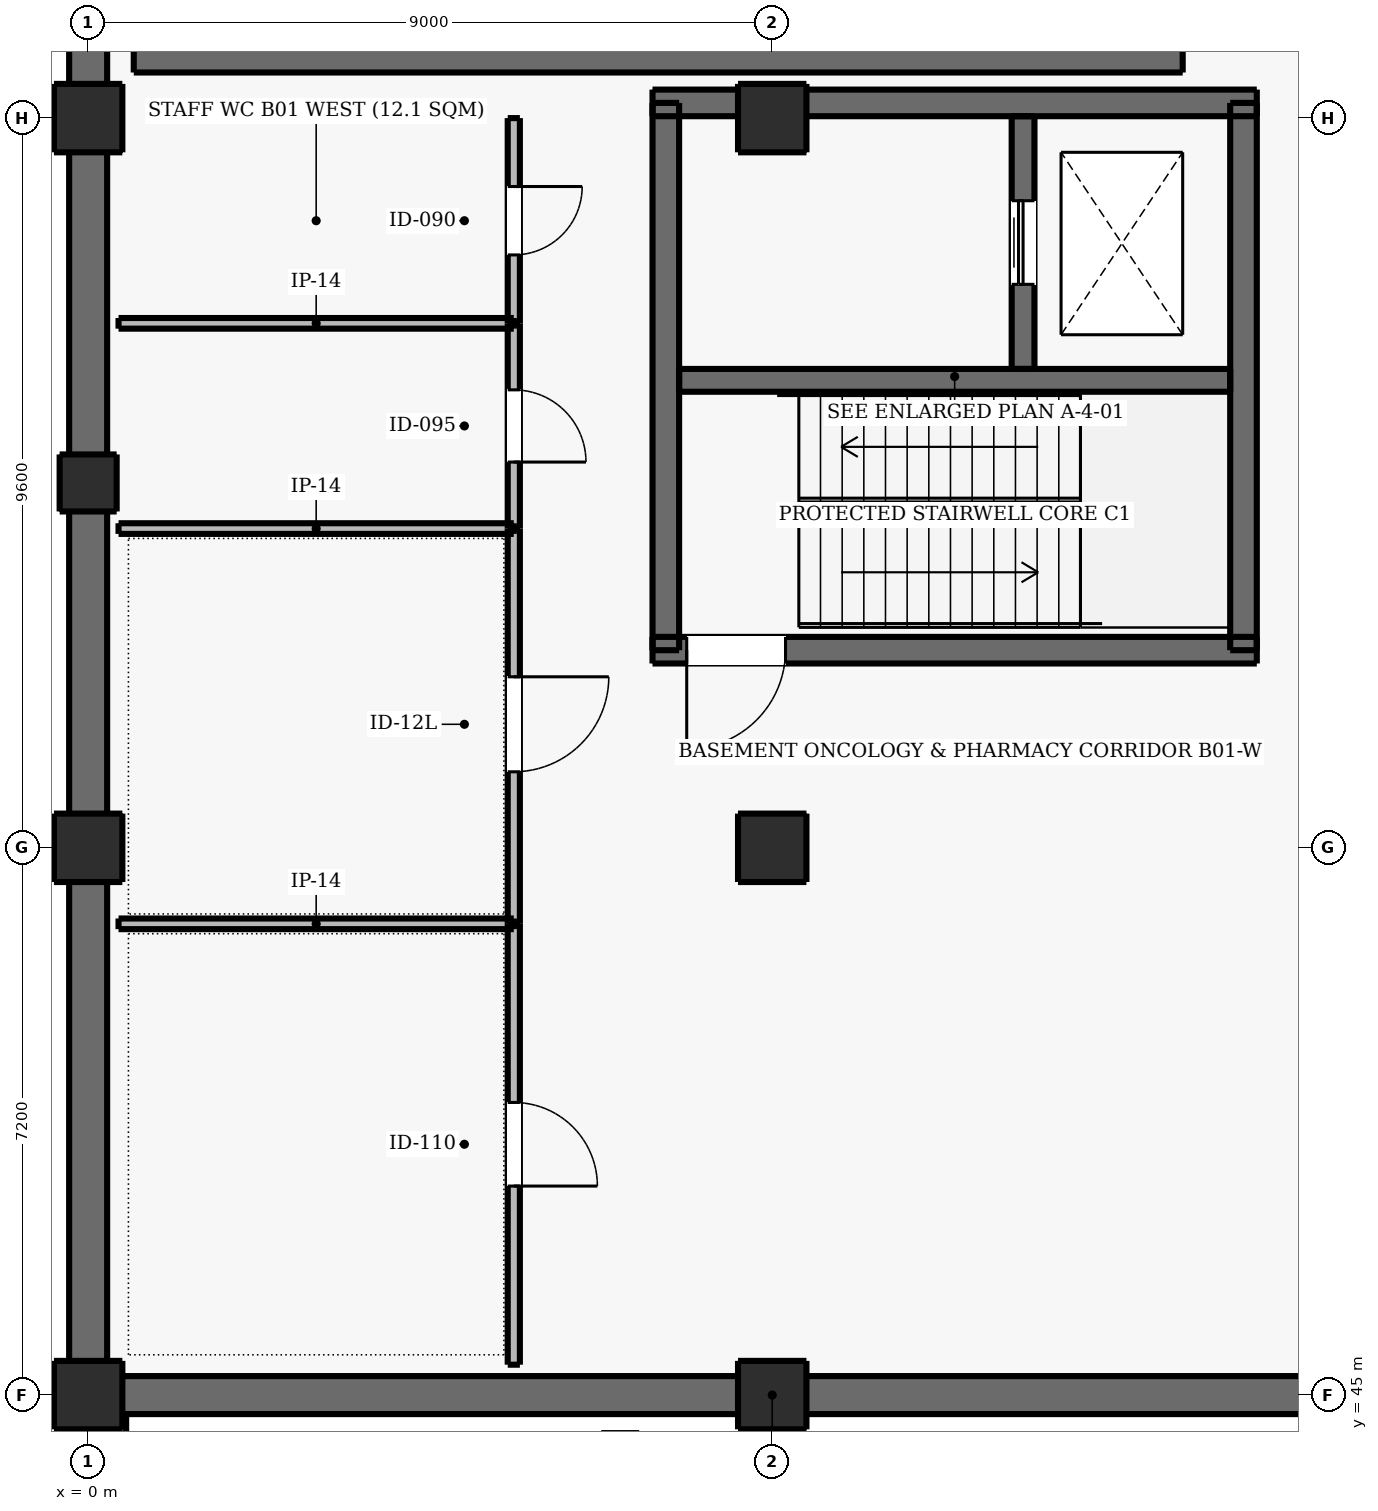
"""IFC4 building model, lengths in metres.
Left out: names, types, materials, properties, quantities, classifications, styles, units other than length and angle.
Written with IfcOpenShell. Run it as: python <this file> out.ifc"""

import sys

from ifc_helpers import new_model, si_unit, direction, frame, frame_2d, origin, origin_2d, place, context, subcontext, project, spatial, rectangle, extrude, element, fill, save


model = new_model("IFC4")
c1 = context("Model", 3, precision=1e-05, world=origin(), true_north=direction((0.0, 1.0)))
c2 = subcontext(c1, "Body", "Model", "MODEL_VIEW")
j1 = project(units=[si_unit("LENGTHUNIT", "METRE"), si_unit("PLANEANGLEUNIT", "RADIAN")], contexts=[c1])
p1 = place(None, origin())
s1 = spatial("IfcSite", under=j1, at=p1, CompositionType="ELEMENT")
p2 = place(p1, origin())
s2 = spatial("IfcBuilding", under=s1, at=p2, CompositionType="ELEMENT")
p3 = place(p2, frame((0.0, 0.0, -4.8)))
s3 = spatial("IfcBuildingStorey", under=s2, at=p3, CompositionType="ELEMENT", Elevation=-4.8)
for number, where, z_axis, x_axis in (
    (1, (0.0, 45.0, 0.0), (0.0, 0.0, 1.0), (1.0, 0.0, 0.0)),
    (2, (0.0, 52.2, 0.0), (0.0, 0.0, 1.0), (1.0, 0.0, 0.0)),
):
    element("IfcColumn", number, at=place(p3, frame(where, z_axis=z_axis, x_axis=x_axis)), inside=s3, PredefinedType="COLUMN", context=c2, shape_type="SweptSolid", body=[
        extrude(rectangle(XDim=0.9, YDim=0.9, at=origin_2d()), origin(), (0.0, 0.0, 1.0), 4.8),
    ])
p4 = place(p3, frame((0.0, 57.0, 0.0), z_axis=(0.0, 0.0, 1.0), x_axis=(1.0, 0.0, 0.0)))
e3 = element("IfcColumn", 3, at=p4, inside=s3, PredefinedType="PILASTER", context=c2, shape_type="SweptSolid", body=[
    extrude(rectangle(XDim=0.75, YDim=0.75, at=origin_2d()), origin(), (0.0, 0.0, 1.0), 4.8),
])
for number, where, z_axis, x_axis in (
    (4, (0.0, 61.8, 0.0), (0.0, 0.0, 1.0), (1.0, 0.0, 0.0)),
    (5, (9.0, 45.0, 0.0), (0.0, 0.0, 1.0), (1.0, 0.0, 0.0)),
    (6, (9.0, 52.2, 0.0), (0.0, 0.0, 1.0), (1.0, 0.0, 0.0)),
    (7, (9.0, 61.8, 0.0), (0.0, 0.0, 1.0), (1.0, 0.0, 0.0)),
):
    element("IfcColumn", number, at=place(p3, frame(where, z_axis=z_axis, x_axis=x_axis)), inside=s3, PredefinedType="COLUMN", context=c2, shape_type="SweptSolid", body=[
        extrude(rectangle(XDim=0.9, YDim=0.9, at=origin_2d()), origin(), (0.0, 0.0, 1.0), 4.8),
    ])
p5 = place(p3, frame((0.6, 63.0, 0.0), z_axis=(0.0, 0.0, 1.0), x_axis=(1.0, 0.0, 0.0)))
e8 = element("IfcWall", 8, at=p5, inside=s3, PredefinedType="SOLIDWALL", context=c2, shape_type="SweptSolid", body=[
    extrude(rectangle(XDim=13.8, YDim=1.2, at=frame_2d((6.9, 0.0))), origin(), (0.0, 0.0, 1.0), 4.5),
])
p6 = place(p3, frame((0.0, 45.0, 0.0), z_axis=(0.0, 0.0, 1.0), x_axis=(0.0, 1.0, 0.0)))
e9 = element("IfcWall", 9, at=p6, inside=s3, PredefinedType="SOLIDWALL", context=c2, shape_type="SweptSolid", body=[
    extrude(rectangle(XDim=50.8, YDim=0.5, at=frame_2d((25.4, 0.0))), origin(), (0.0, 0.0, 1.0), 4.5),
])
p7 = place(p3, frame((18.0, 45.0, 0.0), z_axis=(0.0, 0.0, 1.0), x_axis=(-1.0, 0.0, 0.0)))
e10 = element("IfcWall", 10, at=p7, inside=s3, PredefinedType="SOLIDWALL", context=c2, shape_type="SweptSolid", body=[
    extrude(rectangle(XDim=18.0, YDim=0.5, at=frame_2d((9.0, 0.0))), origin(), (0.0, 0.0, 1.0), 4.5),
])
p8 = place(p3, frame((0.25, 0.5, 0.0), z_axis=(0.0, 0.0, 1.0), x_axis=(0.0, 1.0, 0.0)))
e11 = element("IfcWall", 11, at=p8, inside=s3, PredefinedType="SOLIDWALL", context=c2, shape_type="SweptSolid", body=[
    extrude(rectangle(XDim=44.25, YDim=0.5, at=frame_2d((22.125, 0.0))), origin(), (0.0, 0.0, 1.0), 4.5),
])
p9 = place(p3, frame((7.425, 54.8, 0.0), z_axis=(0.0, 0.0, 1.0), x_axis=(1.0, 0.0, 0.0)))
e12 = element("IfcWall", 12, at=p9, inside=s3, PredefinedType="SHEAR", context=c2, shape_type="SweptSolid", body=[
    extrude(rectangle(XDim=7.95, YDim=0.35, at=frame_2d((3.975, 0.0))), origin(), (0.0, 0.0, 1.0), 4.8),
])
p10 = place(p9, frame((0.45, 0.0, 0.0)))
e13 = element("IfcOpeningElement", 13, at=p10, cuts=e12, PredefinedType="OPENING", context=c2, shape_type="SweptSolid", body=[
    extrude(rectangle(XDim=1.3, YDim=2.15, at=frame_2d((0.65, 1.075))), frame((0.0, 0.185, 0.0), z_axis=(0.0, -1.0, 0.0), x_axis=(1.0, 0.0, 0.0)), (0.0, 0.0, 1.0), 0.37),
])
p11 = place(p3, frame((7.425, 62.0, 0.0), z_axis=(0.0, 0.0, 1.0), x_axis=(1.0, 0.0, 0.0)))
e14 = element("IfcWall", 14, at=p11, inside=s3, PredefinedType="SHEAR", context=c2, shape_type="SweptSolid", body=[
    extrude(rectangle(XDim=7.95, YDim=0.35, at=frame_2d((3.975, 0.0))), origin(), (0.0, 0.0, 1.0), 4.8),
])
for number, where, z_axis, x_axis in (
    (15, (7.6, 54.8, 0.0), (0.0, 0.0, 1.0), (0.0, 1.0, 0.0)),
    (16, (15.2, 54.8, 0.0), (0.0, 0.0, 1.0), (0.0, 1.0, 0.0)),
):
    element("IfcWall", number, at=place(p3, frame(where, z_axis=z_axis, x_axis=x_axis)), inside=s3, PredefinedType="SHEAR", context=c2, shape_type="SweptSolid", body=[
        extrude(rectangle(XDim=7.2, YDim=0.35, at=frame_2d((3.6, 0.0))), origin(), (0.0, 0.0, 1.0), 4.8),
    ])
p12 = place(p3, frame((7.775, 58.35, 0.0), z_axis=(0.0, 0.0, 1.0), x_axis=(1.0, 0.0, 0.0)))
e17 = element("IfcWall", 17, at=p12, inside=s3, PredefinedType="SHEAR", context=c2, shape_type="SweptSolid", body=[
    extrude(rectangle(XDim=7.25, YDim=0.3, at=frame_2d((3.625, 0.0))), origin(), (0.0, 0.0, 1.0), 4.8),
])
p13 = place(p3, frame((12.3, 58.5, 0.0), z_axis=(0.0, 0.0, 1.0), x_axis=(0.0, 1.0, 0.0)))
e18 = element("IfcWall", 18, at=p13, inside=s3, PredefinedType="SHEAR", context=c2, shape_type="SweptSolid", body=[
    extrude(rectangle(XDim=3.325, YDim=0.3, at=frame_2d((1.663, 0.0))), origin(), (0.0, 0.0, 1.0), 4.8),
])
p14 = place(p13, frame((1.113, 0.0, 0.0)))
e19 = element("IfcOpeningElement", 19, at=p14, cuts=e18, PredefinedType="OPENING", context=c2, shape_type="SweptSolid", body=[
    extrude(rectangle(XDim=1.1, YDim=2.15, at=frame_2d((0.55, 1.075))), frame((0.0, 0.16, 0.0), z_axis=(0.0, -1.0, 0.0), x_axis=(1.0, 0.0, 0.0)), (0.0, 0.0, 1.0), 0.32),
])
p15 = place(p3, frame((5.6, 45.4, 0.0), z_axis=(0.0, 0.0, 1.0), x_axis=(0.0, 1.0, 0.0)))
e20 = element("IfcWall", 20, at=p15, inside=s3, PredefinedType="PARTITIONING", context=c2, shape_type="SweptSolid", body=[
    extrude(rectangle(XDim=5.8, YDim=0.16, at=frame_2d((2.9, 0.0))), origin(), (0.0, 0.0, 1.0), 4.5),
])
p16 = place(p15, frame((2.35, 0.0, 0.0)))
e21 = element("IfcOpeningElement", 21, at=p16, cuts=e20, PredefinedType="OPENING", context=c2, shape_type="SweptSolid", body=[
    extrude(rectangle(XDim=1.1, YDim=2.15, at=frame_2d((0.55, 1.075))), frame((0.0, 0.09, 0.0), z_axis=(0.0, -1.0, 0.0), x_axis=(1.0, 0.0, 0.0)), (0.0, 0.0, 1.0), 0.18),
])
p17 = place(p3, frame((0.4, 51.2, 0.0), z_axis=(0.0, 0.0, 1.0), x_axis=(1.0, 0.0, 0.0)))
e22 = element("IfcWall", 22, at=p17, inside=s3, PredefinedType="PARTITIONING", context=c2, shape_type="SweptSolid", body=[
    extrude(rectangle(XDim=5.2, YDim=0.14, at=frame_2d((2.6, 0.0))), origin(), (0.0, 0.0, 1.0), 4.5),
])
p18 = place(p3, frame((5.6, 51.2, 0.0), z_axis=(0.0, 0.0, 1.0), x_axis=(0.0, 1.0, 0.0)))
e23 = element("IfcWall", 23, at=p18, inside=s3, PredefinedType="PARTITIONING", context=c2, shape_type="SweptSolid", body=[
    extrude(rectangle(XDim=5.2, YDim=0.16, at=frame_2d((2.6, 0.0))), origin(), (0.0, 0.0, 1.0), 4.5),
])
p19 = place(p18, frame((2.0, 0.0, 0.0)))
e24 = element("IfcOpeningElement", 24, at=p19, cuts=e23, PredefinedType="OPENING", context=c2, shape_type="SweptSolid", body=[
    extrude(rectangle(XDim=1.25, YDim=2.2, at=frame_2d((0.625, 1.1))), frame((0.0, 0.09, 0.0), z_axis=(0.0, -1.0, 0.0), x_axis=(1.0, 0.0, 0.0)), (0.0, 0.0, 1.0), 0.18),
])
p20 = place(p3, frame((0.4, 56.4, 0.0), z_axis=(0.0, 0.0, 1.0), x_axis=(1.0, 0.0, 0.0)))
e25 = element("IfcWall", 25, at=p20, inside=s3, PredefinedType="PARTITIONING", context=c2, shape_type="SweptSolid", body=[
    extrude(rectangle(XDim=5.2, YDim=0.14, at=frame_2d((2.6, 0.0))), origin(), (0.0, 0.0, 1.0), 4.5),
])
p21 = place(p3, frame((5.6, 56.4, 0.0), z_axis=(0.0, 0.0, 1.0), x_axis=(0.0, 1.0, 0.0)))
e26 = element("IfcWall", 26, at=p21, inside=s3, PredefinedType="PARTITIONING", context=c2, shape_type="SweptSolid", body=[
    extrude(rectangle(XDim=2.7, YDim=0.16, at=frame_2d((1.35, 0.0))), origin(), (0.0, 0.0, 1.0), 4.5),
])
p22 = place(p21, frame((0.875, 0.0, 0.0)))
e27 = element("IfcOpeningElement", 27, at=p22, cuts=e26, PredefinedType="OPENING", context=c2, shape_type="SweptSolid", body=[
    extrude(rectangle(XDim=0.95, YDim=2.1, at=frame_2d((0.475, 1.05))), frame((0.0, 0.09, 0.0), z_axis=(0.0, -1.0, 0.0), x_axis=(1.0, 0.0, 0.0)), (0.0, 0.0, 1.0), 0.18),
])
p23 = place(p3, frame((0.4, 59.1, 0.0), z_axis=(0.0, 0.0, 1.0), x_axis=(1.0, 0.0, 0.0)))
e28 = element("IfcWall", 28, at=p23, inside=s3, PredefinedType="PARTITIONING", context=c2, shape_type="SweptSolid", body=[
    extrude(rectangle(XDim=5.2, YDim=0.14, at=frame_2d((2.6, 0.0))), origin(), (0.0, 0.0, 1.0), 4.5),
])
p24 = place(p3, frame((5.6, 59.1, 0.0), z_axis=(0.0, 0.0, 1.0), x_axis=(0.0, 1.0, 0.0)))
e29 = element("IfcWall", 29, at=p24, inside=s3, PredefinedType="PARTITIONING", context=c2, shape_type="SweptSolid", body=[
    extrude(rectangle(XDim=2.7, YDim=0.16, at=frame_2d((1.35, 0.0))), origin(), (0.0, 0.0, 1.0), 4.5),
])
p25 = place(p24, frame((0.9, 0.0, 0.0)))
e30 = element("IfcOpeningElement", 30, at=p25, cuts=e29, PredefinedType="OPENING", context=c2, shape_type="SweptSolid", body=[
    extrude(rectangle(XDim=0.9, YDim=2.1, at=frame_2d((0.45, 1.05))), frame((0.0, 0.09, 0.0), z_axis=(0.0, -1.0, 0.0), x_axis=(1.0, 0.0, 0.0)), (0.0, 0.0, 1.0), 0.18),
])
p26 = place(p14, origin())
e31 = element("IfcDoor", 31, at=p26, inside=s3, OperationType="DOUBLE_DOOR_SLIDING", PredefinedType="DOOR", context=c2, shape_type="SweptSolid", body=[
    extrude(rectangle(XDim=1.1, YDim=2.15, at=frame_2d((0.55, 1.075))), frame((0.0, 0.025, 0.0), z_axis=(0.0, -1.0, 0.0), x_axis=(1.0, 0.0, 0.0)), (0.0, 0.0, 1.0), 0.05),
])
fill(e19, e31)
p27 = place(p10, frame((1.3, 0.0, 0.0), z_axis=(0.0, 0.0, 1.0), x_axis=(-1.0, 0.0, 0.0)))
e32 = element("IfcDoor", 32, at=p27, inside=s3, OperationType="SINGLE_SWING_LEFT", PredefinedType="DOOR", context=c2, shape_type="SweptSolid", body=[
    extrude(rectangle(XDim=1.3, YDim=2.15, at=frame_2d((0.65, 1.075))), frame((0.0, 0.025, 0.0), z_axis=(0.0, -1.0, 0.0), x_axis=(1.0, 0.0, 0.0)), (0.0, 0.0, 1.0), 0.05),
])
fill(e13, e32)
p28 = place(p16, frame((1.1, 0.0, 0.0), z_axis=(0.0, 0.0, 1.0), x_axis=(-1.0, 0.0, 0.0)))
e33 = element("IfcDoor", 33, at=p28, inside=s3, OperationType="SINGLE_SWING_LEFT", PredefinedType="DOOR", context=c2, shape_type="SweptSolid", body=[
    extrude(rectangle(XDim=1.1, YDim=2.15, at=frame_2d((0.55, 1.075))), frame((0.0, 0.025, 0.0), z_axis=(0.0, -1.0, 0.0), x_axis=(1.0, 0.0, 0.0)), (0.0, 0.0, 1.0), 0.05),
])
fill(e21, e33)
p29 = place(p19, frame((1.25, 0.0, 0.0), z_axis=(0.0, 0.0, 1.0), x_axis=(-1.0, 0.0, 0.0)))
e34 = element("IfcDoor", 34, at=p29, inside=s3, OperationType="SINGLE_SWING_RIGHT", PredefinedType="DOOR", context=c2, shape_type="SweptSolid", body=[
    extrude(rectangle(XDim=1.25, YDim=2.2, at=frame_2d((0.625, 1.1))), frame((0.0, 0.025, 0.0), z_axis=(0.0, -1.0, 0.0), x_axis=(1.0, 0.0, 0.0)), (0.0, 0.0, 1.0), 0.05),
])
fill(e24, e34)
p30 = place(p22, frame((0.95, 0.0, 0.0), z_axis=(0.0, 0.0, 1.0), x_axis=(-1.0, 0.0, 0.0)))
e35 = element("IfcDoor", 35, at=p30, inside=s3, OperationType="SINGLE_SWING_LEFT", PredefinedType="DOOR", context=c2, shape_type="SweptSolid", body=[
    extrude(rectangle(XDim=0.95, YDim=2.1, at=frame_2d((0.475, 1.05))), frame((0.0, 0.025, 0.0), z_axis=(0.0, -1.0, 0.0), x_axis=(1.0, 0.0, 0.0)), (0.0, 0.0, 1.0), 0.05),
])
fill(e27, e35)
p31 = place(p25, frame((0.9, 0.0, 0.0), z_axis=(0.0, 0.0, 1.0), x_axis=(-1.0, 0.0, 0.0)))
e36 = element("IfcDoor", 36, at=p31, inside=s3, OperationType="SINGLE_SWING_RIGHT", PredefinedType="DOOR", context=c2, shape_type="SweptSolid", body=[
    extrude(rectangle(XDim=0.9, YDim=2.1, at=frame_2d((0.45, 1.05))), frame((0.0, 0.025, 0.0), z_axis=(0.0, -1.0, 0.0), x_axis=(1.0, 0.0, 0.0)), (0.0, 0.0, 1.0), 0.05),
])
fill(e30, e36)
save(model, sys.argv[1])
